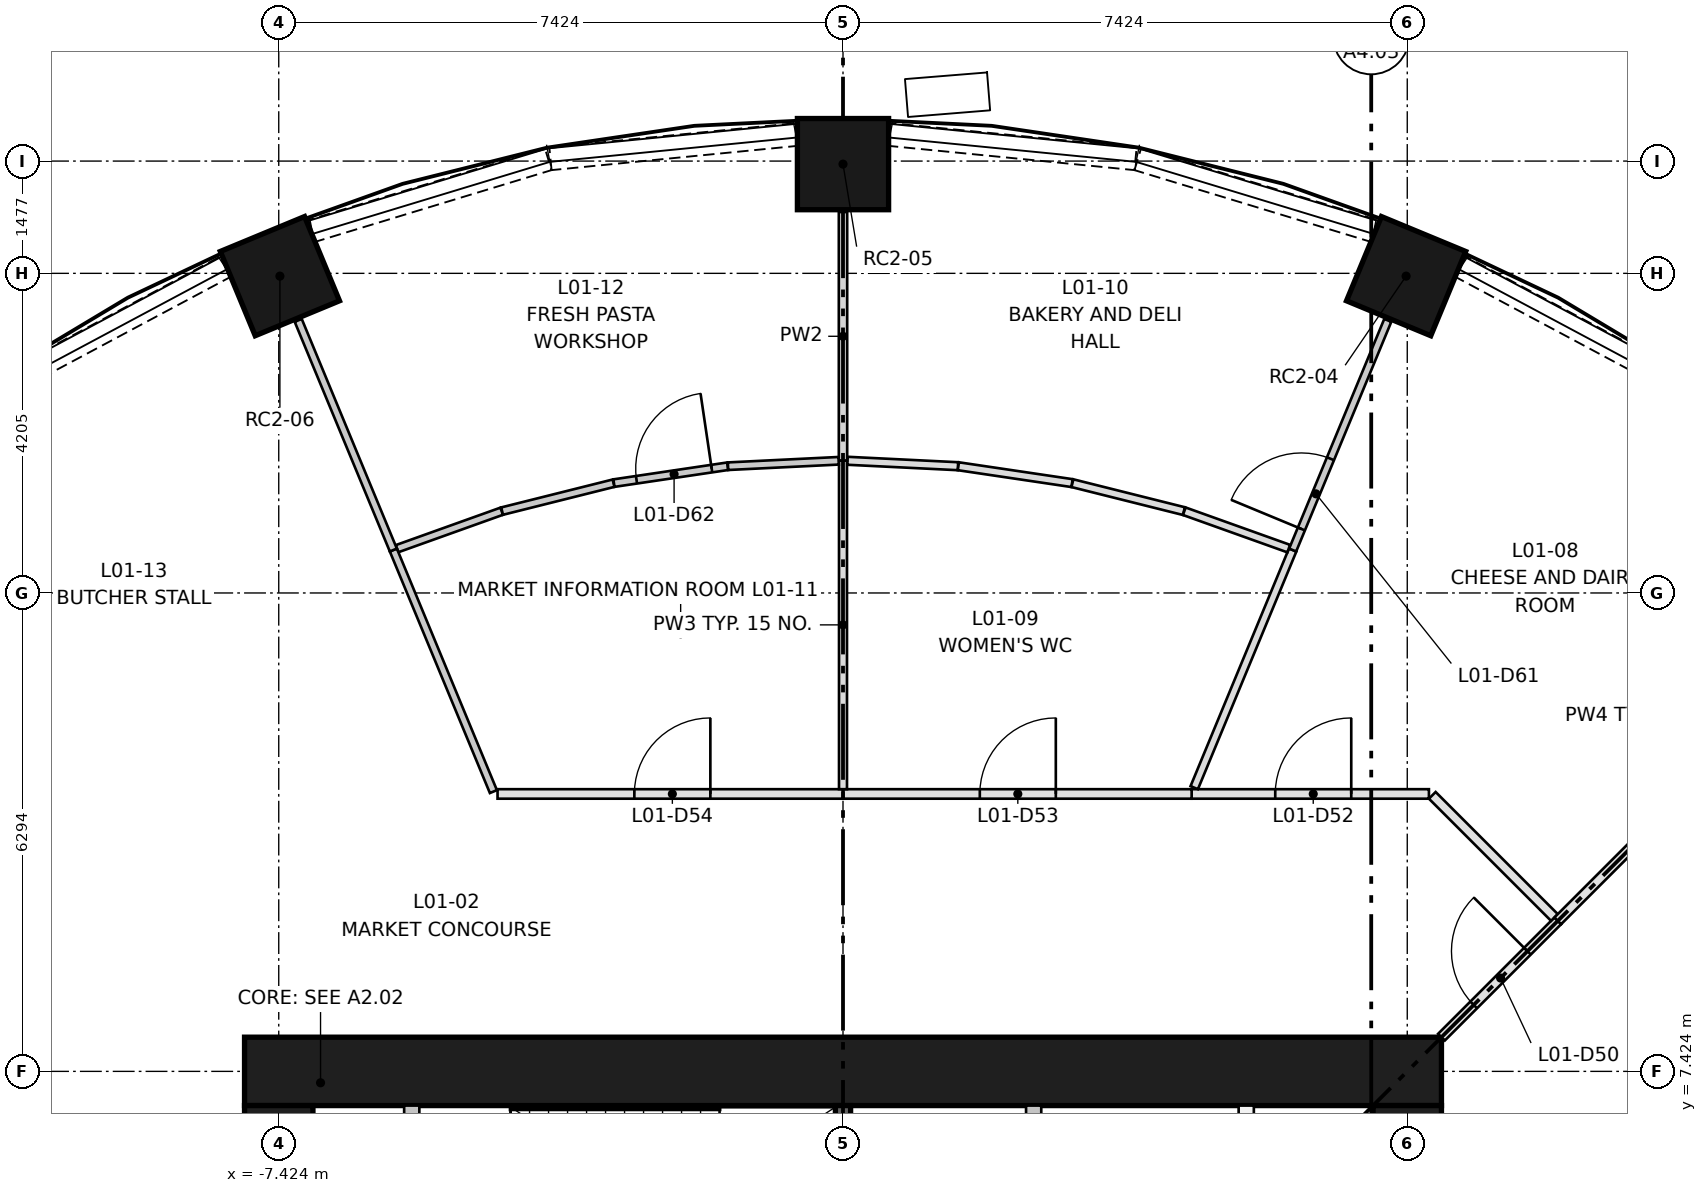
"""IFC4 building model, lengths in metres.
Left out: names, types, materials, properties, quantities, classifications, styles, units other than length and angle.
Written with IfcOpenShell. Run it as: python <this file> out.ifc"""

import sys

from ifc_helpers import new_model, si_unit, direction, frame, frame_2d, origin, origin_2d, place, context, subcontext, project, spatial, rectangle, extrude, element, fill, save


model = new_model("IFC4")
c1 = context("Model", 3, precision=1e-05, world=origin(), true_north=direction((0.0, 1.0)))
c2 = subcontext(c1, "Body", "Model", "MODEL_VIEW")
j1 = project(units=[si_unit("LENGTHUNIT", "METRE"), si_unit("PLANEANGLEUNIT", "RADIAN")], contexts=[c1])
p1 = place(None, origin())
s1 = spatial("IfcSite", under=j1, at=p1, CompositionType="ELEMENT")
p2 = place(p1, origin())
s2 = spatial("IfcBuilding", under=s1, at=p2, CompositionType="ELEMENT")
p3 = place(p2, frame((0.0, 0.0, 5.2)))
s3 = spatial("IfcBuildingStorey", under=s2, at=p3, CompositionType="ELEMENT", Elevation=5.2)
for number, where, z_axis, x_axis in (
    (1, (7.409, 17.886, 0.0), (0.0, 0.0, 1.0), (0.383, 0.924, 0.0)),
    (2, (0.0, 19.36, 0.0), (0.0, 0.0, 1.0), (0.0, 1.0, 0.0)),
    (3, (-7.409, 17.886, 0.0), (0.0, 0.0, 1.0), (-0.383, 0.924, 0.0)),
):
    element("IfcColumn", number, at=place(p3, frame(where, z_axis=z_axis, x_axis=x_axis)), inside=s3, PredefinedType="COLUMN", context=c2, shape_type="SweptSolid", body=[
        extrude(rectangle(XDim=1.2, YDim=1.2, at=origin_2d()), origin(), (0.0, 0.0, 1.0), 4.7),
    ])
p4 = place(p3, frame((-7.874, 7.424, 0.0), z_axis=(0.0, 0.0, 1.0), x_axis=(1.0, 0.0, 0.0)))
e4 = element("IfcWall", 4, at=p4, inside=s3, PredefinedType="SHEAR", context=c2, shape_type="SweptSolid", body=[
    extrude(rectangle(XDim=15.748, YDim=0.9, at=frame_2d((7.874, 0.0))), origin(), (0.0, 0.0, 1.0), 4.7),
])
p5 = place(p3, frame((-7.424, -6.974, 0.0), z_axis=(0.0, 0.0, 1.0), x_axis=(0.0, 1.0, 0.0)))
e5 = element("IfcWall", 5, at=p5, inside=s3, PredefinedType="SHEAR", context=c2, shape_type="SweptSolid", body=[
    extrude(rectangle(XDim=13.948, YDim=0.9, at=frame_2d((6.974, 0.0))), origin(), (0.0, 0.0, 1.0), 4.7),
])
p6 = place(p5, frame((6.474, 0.0, 0.0)))
e6 = element("IfcOpeningElement", 6, at=p6, cuts=e5, PredefinedType="OPENING", context=c2, shape_type="SweptSolid", body=[
    extrude(rectangle(XDim=1.0, YDim=2.1, at=frame_2d((0.5, 1.05))), frame((0.0, 0.46, 0.0), z_axis=(0.0, -1.0, 0.0), x_axis=(1.0, 0.0, 0.0)), (0.0, 0.0, 1.0), 0.92),
])
p7 = place(p5, frame((3.35, 0.0, 0.0)))
e7 = element("IfcOpeningElement", 7, at=p7, cuts=e5, PredefinedType="OPENING", context=c2, shape_type="SweptSolid", body=[
    extrude(rectangle(XDim=1.8, YDim=2.1, at=frame_2d((0.9, 1.05))), frame((0.0, 0.46, 0.0), z_axis=(0.0, -1.0, 0.0), x_axis=(1.0, 0.0, 0.0)), (0.0, 0.0, 1.0), 0.92),
])
p8 = place(p5, frame((8.799, 0.0, 0.0)))
e8 = element("IfcOpeningElement", 8, at=p8, cuts=e5, PredefinedType="OPENING", context=c2, shape_type="SweptSolid", body=[
    extrude(rectangle(XDim=1.8, YDim=2.1, at=frame_2d((0.9, 1.05))), frame((0.0, 0.46, 0.0), z_axis=(0.0, -1.0, 0.0), x_axis=(1.0, 0.0, 0.0)), (0.0, 0.0, 1.0), 0.92),
])
p9 = place(p5, frame((11.974, 0.0, 0.0)))
e9 = element("IfcOpeningElement", 9, at=p9, cuts=e5, PredefinedType="OPENING", context=c2, shape_type="SweptSolid", body=[
    extrude(rectangle(XDim=1.0, YDim=2.1, at=frame_2d((0.5, 1.05))), frame((0.0, 0.46, 0.0), z_axis=(0.0, -1.0, 0.0), x_axis=(1.0, 0.0, 0.0)), (0.0, 0.0, 1.0), 0.92),
])
p10 = place(p3, frame((7.424, -6.974, 0.0), z_axis=(0.0, 0.0, 1.0), x_axis=(0.0, 1.0, 0.0)))
e10 = element("IfcWall", 10, at=p10, inside=s3, PredefinedType="SHEAR", context=c2, shape_type="SweptSolid", body=[
    extrude(rectangle(XDim=13.948, YDim=0.9, at=frame_2d((6.974, 0.0))), origin(), (0.0, 0.0, 1.0), 4.7),
])
p11 = place(p10, frame((6.474, 0.0, 0.0)))
e11 = element("IfcOpeningElement", 11, at=p11, cuts=e10, PredefinedType="OPENING", context=c2, shape_type="SweptSolid", body=[
    extrude(rectangle(XDim=1.0, YDim=2.1, at=frame_2d((0.5, 1.05))), frame((0.0, 0.46, 0.0), z_axis=(0.0, -1.0, 0.0), x_axis=(1.0, 0.0, 0.0)), (0.0, 0.0, 1.0), 0.92),
])
p12 = place(p10, frame((3.35, 0.0, 0.0)))
e12 = element("IfcOpeningElement", 12, at=p12, cuts=e10, PredefinedType="OPENING", context=c2, shape_type="SweptSolid", body=[
    extrude(rectangle(XDim=1.8, YDim=2.1, at=frame_2d((0.9, 1.05))), frame((0.0, 0.46, 0.0), z_axis=(0.0, -1.0, 0.0), x_axis=(1.0, 0.0, 0.0)), (0.0, 0.0, 1.0), 0.92),
])
p13 = place(p10, frame((8.799, 0.0, 0.0)))
e13 = element("IfcOpeningElement", 13, at=p13, cuts=e10, PredefinedType="OPENING", context=c2, shape_type="SweptSolid", body=[
    extrude(rectangle(XDim=1.8, YDim=2.1, at=frame_2d((0.9, 1.05))), frame((0.0, 0.46, 0.0), z_axis=(0.0, -1.0, 0.0), x_axis=(1.0, 0.0, 0.0)), (0.0, 0.0, 1.0), 0.92),
])
p14 = place(p3, frame((0.0, 5.574, 0.0), z_axis=(0.0, 0.0, 1.0), x_axis=(0.0, 1.0, 0.0)))
e14 = element("IfcWall", 14, at=p14, inside=s3, PredefinedType="SHEAR", context=c2, shape_type="SweptSolid", body=[
    extrude(rectangle(XDim=1.4, YDim=0.2, at=frame_2d((0.7, 0.0))), origin(), (0.0, 0.0, 1.0), 4.3),
])
for number, where, z_axis, x_axis in (
    (15, (2.509, 4.174, 0.0), (0.0, 0.0, 1.0), (0.0, 1.0, 0.0)),
    (16, (5.305, 4.174, 0.0), (0.0, 0.0, 1.0), (0.0, 1.0, 0.0)),
):
    element("IfcWall", number, at=place(p3, frame(where, z_axis=z_axis, x_axis=x_axis)), inside=s3, PredefinedType="PARTITIONING", context=c2, shape_type="SweptSolid", body=[
        extrude(rectangle(XDim=2.8, YDim=0.2, at=frame_2d((1.4, 0.0))), origin(), (0.0, 0.0, 1.0), 4.3),
    ])
p15 = place(p3, frame((-5.674, 4.174, 0.0), z_axis=(0.0, 0.0, 1.0), x_axis=(0.0, 1.0, 0.0)))
e17 = element("IfcWall", 17, at=p15, inside=s3, PredefinedType="PARTITIONING", context=c2, shape_type="SweptSolid", body=[
    extrude(rectangle(XDim=2.8, YDim=0.2, at=frame_2d((1.4, 0.0))), origin(), (0.0, 0.0, 1.0), 4.3),
])
p16 = place(p15, frame((0.125, 0.0, 0.0)))
e18 = element("IfcOpeningElement", 18, at=p16, cuts=e17, PredefinedType="OPENING", context=c2, shape_type="SweptSolid", body=[
    extrude(rectangle(XDim=0.95, YDim=2.1, at=frame_2d((0.475, 1.05))), frame((0.0, 0.11, 0.0), z_axis=(0.0, -1.0, 0.0), x_axis=(1.0, 0.0, 0.0)), (0.0, 0.0, 1.0), 0.22),
])
p17 = place(p15, frame((1.725, 0.0, 0.0)))
e19 = element("IfcOpeningElement", 19, at=p17, cuts=e17, PredefinedType="OPENING", context=c2, shape_type="SweptSolid", body=[
    extrude(rectangle(XDim=0.95, YDim=2.1, at=frame_2d((0.475, 1.05))), frame((0.0, 0.11, 0.0), z_axis=(0.0, -1.0, 0.0), x_axis=(1.0, 0.0, 0.0)), (0.0, 0.0, 1.0), 0.22),
])
p18 = place(p3, frame((10.993, 16.478, 0.0), z_axis=(0.0, 0.0, 1.0), x_axis=(-0.881968250723, 0.471308820961, 0.0)))
e20 = element("IfcWall", 20, at=p18, inside=s3, PredefinedType="SOLIDWALL", context=c2, shape_type="SweptSolid", body=[
    extrude(rectangle(XDim=3.252, YDim=0.3, at=frame_2d((1.626, 0.0))), origin(), (0.0, 0.0, 1.0), 0.45),
])
p19 = place(p3, frame((6.99, 18.48, 0.0), z_axis=(0.0, 0.0, 1.0), x_axis=(-0.956935334366, 0.290301164038, 0.0)))
e21 = element("IfcWall", 21, at=p19, inside=s3, PredefinedType="SOLIDWALL", context=c2, shape_type="SweptSolid", body=[
    extrude(rectangle(XDim=3.252, YDim=0.3, at=frame_2d((1.626, 0.0))), origin(), (0.0, 0.0, 1.0), 0.45),
])
for number, where, z_axis, x_axis in (
    (22, (3.849, 19.43, 0.0), (0.0, 0.0, 1.0), (-0.995, 0.098, 0.0)),
    (23, (-0.613, 19.75, 0.0), (0.0, 0.0, 1.0), (-0.995, -0.098, 0.0)),
):
    element("IfcWall", number, at=place(p3, frame(where, z_axis=z_axis, x_axis=x_axis)), inside=s3, PredefinedType="SOLIDWALL", context=c2, shape_type="SweptSolid", body=[
        extrude(rectangle(XDim=3.252, YDim=0.3, at=frame_2d((1.626, 0.0))), origin(), (0.0, 0.0, 1.0), 0.45),
    ])
p20 = place(p3, frame((-3.878, 19.425, 0.0), z_axis=(0.0, 0.0, 1.0), x_axis=(-0.956935334366, -0.290301164038, 0.0)))
e24 = element("IfcWall", 24, at=p20, inside=s3, PredefinedType="SOLIDWALL", context=c2, shape_type="SweptSolid", body=[
    extrude(rectangle(XDim=3.252, YDim=0.3, at=frame_2d((1.626, 0.0))), origin(), (0.0, 0.0, 1.0), 0.45),
])
p21 = place(p3, frame((-8.124, 18.011, 0.0), z_axis=(0.0, 0.0, 1.0), x_axis=(-0.881968250723, -0.471308820961, 0.0)))
e25 = element("IfcWall", 25, at=p21, inside=s3, PredefinedType="SOLIDWALL", context=c2, shape_type="SweptSolid", body=[
    extrude(rectangle(XDim=3.252, YDim=0.3, at=frame_2d((1.626, 0.0))), origin(), (0.0, 0.0, 1.0), 0.45),
])
p22 = place(p3, frame((7.874, 7.874, 0.0), z_axis=(0.0, 0.0, 1.0), x_axis=(0.707106781187, 0.707106781187, 0.0)))
e26 = element("IfcWall", 26, at=p22, inside=s3, PredefinedType="PARTITIONING", context=c2, shape_type="SweptSolid", body=[
    extrude(rectangle(XDim=2.165, YDim=0.125, at=frame_2d((1.082, 0.0))), origin(), (0.0, 0.0, 1.0), 4.3),
])
p23 = place(p22, frame((0.6, 0.0, 0.0)))
e27 = element("IfcOpeningElement", 27, at=p23, cuts=e26, PredefinedType="OPENING", context=c2, shape_type="SweptSolid", body=[
    extrude(rectangle(XDim=1.0, YDim=2.1, at=frame_2d((0.5, 1.05))), frame((0.0, 0.073, 0.0), z_axis=(0.0, -1.0, 0.0), x_axis=(1.0, 0.0, 0.0)), (0.0, 0.0, 1.0), 0.145),
])
p24 = place(p3, frame((4.587, 11.074, 0.0), z_axis=(0.0, 0.0, 1.0), x_axis=(1.0, 0.0, 0.0)))
e28 = element("IfcWall", 28, at=p24, inside=s3, PredefinedType="PARTITIONING", context=c2, shape_type="SweptSolid", body=[
    extrude(rectangle(XDim=3.122, YDim=0.125, at=frame_2d((1.561, 0.0))), origin(), (0.0, 0.0, 1.0), 4.3),
])
p25 = place(p24, frame((1.1, 0.0, 0.0)))
e29 = element("IfcOpeningElement", 29, at=p25, cuts=e28, PredefinedType="OPENING", context=c2, shape_type="SweptSolid", body=[
    extrude(rectangle(XDim=1.0, YDim=2.1, at=frame_2d((0.5, 1.05))), frame((0.0, 0.073, 0.0), z_axis=(0.0, -1.0, 0.0), x_axis=(1.0, 0.0, 0.0)), (0.0, 0.0, 1.0), 0.145),
])
p26 = place(p3, frame((7.753, 11.056, 0.0), z_axis=(0.0, 0.0, 1.0), x_axis=(0.707106781187, -0.707106781187, 0.0)))
e30 = element("IfcWall", 30, at=p26, inside=s3, PredefinedType="PARTITIONING", context=c2, shape_type="SweptSolid", body=[
    extrude(rectangle(XDim=2.272, YDim=0.125, at=frame_2d((1.136, 0.0))), origin(), (0.0, 0.0, 1.0), 4.3),
])
p27 = place(p3, frame((0.0, 11.074, 0.0), z_axis=(0.0, 0.0, 1.0), x_axis=(1.0, 0.0, 0.0)))
e31 = element("IfcWall", 31, at=p27, inside=s3, PredefinedType="PARTITIONING", context=c2, shape_type="SweptSolid", body=[
    extrude(rectangle(XDim=4.587, YDim=0.125, at=frame_2d((2.293, 0.0))), origin(), (0.0, 0.0, 1.0), 4.3),
])
p28 = place(p27, frame((1.8, 0.0, 0.0)))
e32 = element("IfcOpeningElement", 32, at=p28, cuts=e31, PredefinedType="OPENING", context=c2, shape_type="SweptSolid", body=[
    extrude(rectangle(XDim=1.0, YDim=2.1, at=frame_2d((0.5, 1.05))), frame((0.0, 0.073, 0.0), z_axis=(0.0, -1.0, 0.0), x_axis=(1.0, 0.0, 0.0)), (0.0, 0.0, 1.0), 0.145),
])
p29 = place(p3, frame((-4.545, 11.074, 0.0), z_axis=(0.0, 0.0, 1.0), x_axis=(1.0, 0.0, 0.0)))
e33 = element("IfcWall", 33, at=p29, inside=s3, PredefinedType="PARTITIONING", context=c2, shape_type="SweptSolid", body=[
    extrude(rectangle(XDim=4.545, YDim=0.125, at=frame_2d((2.272, 0.0))), origin(), (0.0, 0.0, 1.0), 4.3),
])
p30 = place(p29, frame((1.8, 0.0, 0.0)))
e34 = element("IfcOpeningElement", 34, at=p30, cuts=e33, PredefinedType="OPENING", context=c2, shape_type="SweptSolid", body=[
    extrude(rectangle(XDim=1.0, YDim=2.1, at=frame_2d((0.5, 1.05))), frame((0.0, 0.073, 0.0), z_axis=(0.0, -1.0, 0.0), x_axis=(1.0, 0.0, 0.0)), (0.0, 0.0, 1.0), 0.145),
])
p31 = place(p3, frame((9.405, 9.405, 0.0), z_axis=(0.0, 0.0, 1.0), x_axis=(0.707106781187, 0.707106781187, 0.0)))
e35 = element("IfcWall", 35, at=p31, inside=s3, PredefinedType="PARTITIONING", context=c2, shape_type="SweptSolid", body=[
    extrude(rectangle(XDim=5.43, YDim=0.125, at=frame_2d((2.715, 0.0))), origin(), (0.0, 0.0, 1.0), 4.3),
])
p32 = place(p3, frame((4.621, 11.156, 0.0), z_axis=(0.0, 0.0, 1.0), x_axis=(0.382693709436, 0.923875275542, 0.0)))
e36 = element("IfcWall", 36, at=p32, inside=s3, PredefinedType="PARTITIONING", context=c2, shape_type="SweptSolid", body=[
    extrude(rectangle(XDim=3.384, YDim=0.105, at=frame_2d((1.692, 0.0))), origin(), (0.0, 0.0, 1.0), 4.3),
])
p33 = place(p3, frame((5.916, 14.283, 0.0), z_axis=(0.0, 0.0, 1.0), x_axis=(0.382716658507, 0.923865769093, 0.0)))
e37 = element("IfcWall", 37, at=p33, inside=s3, PredefinedType="PARTITIONING", context=c2, shape_type="SweptSolid", body=[
    extrude(rectangle(XDim=3.27, YDim=0.1, at=frame_2d((1.635, 0.0))), origin(), (0.0, 0.0, 1.0), 4.3),
])
p34 = place(p33, frame((0.3, 0.0, 0.0)))
e38 = element("IfcOpeningElement", 38, at=p34, cuts=e37, PredefinedType="OPENING", context=c2, shape_type="SweptSolid", body=[
    extrude(rectangle(XDim=1.0, YDim=2.1, at=frame_2d((0.5, 1.05))), frame((0.0, 0.06, 0.0), z_axis=(0.0, -1.0, 0.0), x_axis=(1.0, 0.0, 0.0)), (0.0, 0.0, 1.0), 0.12),
])
p35 = place(p3, frame((0.058, 15.457, 0.0), z_axis=(0.0, 0.0, 1.0), x_axis=(0.998793780374, -0.049101774773, 0.0)))
e39 = element("IfcWall", 39, at=p35, inside=s3, PredefinedType="PARTITIONING", context=c2, shape_type="SweptSolid", body=[
    extrude(rectangle(XDim=1.457, YDim=0.105, at=frame_2d((0.729, 0.0))), origin(), (0.0, 0.0, 1.0), 4.3),
])
for number, where, z_axis, x_axis in (
    (40, (1.518, 15.385, 0.0), (0.0, 0.0, 1.0), (0.989, -0.147, 0.0)),
    (41, (3.019, 15.162, 0.0), (0.0, 0.0, 1.0), (0.97, -0.243, 0.0)),
):
    element("IfcWall", number, at=place(p3, frame(where, z_axis=z_axis, x_axis=x_axis)), inside=s3, PredefinedType="PARTITIONING", context=c2, shape_type="SweptSolid", body=[
        extrude(rectangle(XDim=1.512, YDim=0.105, at=frame_2d((0.756, 0.0))), origin(), (0.0, 0.0, 1.0), 4.3),
    ])
p36 = place(p3, frame((4.49, 14.793, 0.0), z_axis=(0.0, 0.0, 1.0), x_axis=(0.941548755583, -0.336876744314, 0.0)))
e42 = element("IfcWall", 42, at=p36, inside=s3, PredefinedType="PARTITIONING", context=c2, shape_type="SweptSolid", body=[
    extrude(rectangle(XDim=1.459, YDim=0.105, at=frame_2d((0.73, 0.0))), origin(), (0.0, 0.0, 1.0), 4.3),
])
p37 = place(p3, frame((0.0, 11.136, 0.0), z_axis=(0.0, 0.0, 1.0), x_axis=(0.0, 1.0, 0.0)))
e43 = element("IfcWall", 43, at=p37, inside=s3, PredefinedType="PARTITIONING", context=c2, shape_type="SweptSolid", body=[
    extrude(rectangle(XDim=4.323, YDim=0.105, at=frame_2d((2.162, 0.0))), origin(), (0.0, 0.0, 1.0), 4.3),
])
p38 = place(p3, frame((0.0, 15.46, 0.0), z_axis=(0.0, 0.0, 1.0), x_axis=(0.0, 1.0, 0.0)))
e44 = element("IfcWall", 44, at=p38, inside=s3, PredefinedType="PARTITIONING", context=c2, shape_type="SweptSolid", body=[
    extrude(rectangle(XDim=3.27, YDim=0.11, at=frame_2d((1.635, 0.0))), origin(), (0.0, 0.0, 1.0), 4.3),
])
p39 = place(p3, frame((-5.867, 14.301, 0.0), z_axis=(0.0, 0.0, 1.0), x_axis=(0.941545350251, 0.336886261845, 0.0)))
e45 = element("IfcWall", 45, at=p39, inside=s3, PredefinedType="PARTITIONING", context=c2, shape_type="SweptSolid", body=[
    extrude(rectangle(XDim=1.462, YDim=0.1, at=frame_2d((0.731, 0.0))), origin(), (0.0, 0.0, 1.0), 4.3),
])
p40 = place(p3, frame((-4.485, 14.795, 0.0), z_axis=(0.0, 0.0, 1.0), x_axis=(0.970028424003, 0.242991474388, 0.0)))
e46 = element("IfcWall", 46, at=p40, inside=s3, PredefinedType="PARTITIONING", context=c2, shape_type="SweptSolid", body=[
    extrude(rectangle(XDim=1.512, YDim=0.1, at=frame_2d((0.756, 0.0))), origin(), (0.0, 0.0, 1.0), 4.3),
])
p41 = place(p3, frame((-3.014, 15.163, 0.0), z_axis=(0.0, 0.0, 1.0), x_axis=(0.989176578649, 0.146730011422, 0.0)))
e47 = element("IfcWall", 47, at=p41, inside=s3, PredefinedType="PARTITIONING", context=c2, shape_type="SweptSolid", body=[
    extrude(rectangle(XDim=1.512, YDim=0.1, at=frame_2d((0.756, 0.0))), origin(), (0.0, 0.0, 1.0), 4.3),
])
p42 = place(p41, frame((0.3, 0.0, 0.0)))
e48 = element("IfcOpeningElement", 48, at=p42, cuts=e47, PredefinedType="OPENING", context=c2, shape_type="SweptSolid", body=[
    extrude(rectangle(XDim=1.0, YDim=2.1, at=frame_2d((0.5, 1.05))), frame((0.0, 0.06, 0.0), z_axis=(0.0, -1.0, 0.0), x_axis=(1.0, 0.0, 0.0)), (0.0, 0.0, 1.0), 0.12),
])
p43 = place(p3, frame((-1.513, 15.386, 0.0), z_axis=(0.0, 0.0, 1.0), x_axis=(0.998793780374, 0.049101774773, 0.0)))
e49 = element("IfcWall", 49, at=p43, inside=s3, PredefinedType="PARTITIONING", context=c2, shape_type="SweptSolid", body=[
    extrude(rectangle(XDim=1.457, YDim=0.1, at=frame_2d((0.729, 0.0))), origin(), (0.0, 0.0, 1.0), 4.3),
])
p44 = place(p3, frame((-4.6, 11.105, 0.0), z_axis=(0.0, 0.0, 1.0), x_axis=(-0.382669369174, 0.92388535755, 0.0)))
e50 = element("IfcWall", 50, at=p44, inside=s3, PredefinedType="PARTITIONING", context=c2, shape_type="SweptSolid", body=[
    extrude(rectangle(XDim=3.44, YDim=0.1, at=frame_2d((1.72, 0.0))), origin(), (0.0, 0.0, 1.0), 4.3),
])
p45 = place(p3, frame((-5.916, 14.283, 0.0), z_axis=(0.0, 0.0, 1.0), x_axis=(-0.382716658507, 0.923865769093, 0.0)))
e51 = element("IfcWall", 51, at=p45, inside=s3, PredefinedType="PARTITIONING", context=c2, shape_type="SweptSolid", body=[
    extrude(rectangle(XDim=3.27, YDim=0.1, at=frame_2d((1.635, 0.0))), origin(), (0.0, 0.0, 1.0), 4.3),
])
p46 = place(p23, origin())
e52 = element("IfcDoor", 52, at=p46, inside=s3, OperationType="SINGLE_SWING_RIGHT", PredefinedType="DOOR", context=c2, shape_type="SweptSolid", body=[
    extrude(rectangle(XDim=1.0, YDim=2.1, at=frame_2d((0.5, 1.05))), frame((0.0, 0.025, 0.0), z_axis=(0.0, -1.0, 0.0), x_axis=(1.0, 0.0, 0.0)), (0.0, 0.0, 1.0), 0.05),
])
fill(e27, e52)
p47 = place(p25, origin())
e53 = element("IfcDoor", 53, at=p47, inside=s3, OperationType="SINGLE_SWING_RIGHT", PredefinedType="DOOR", context=c2, shape_type="SweptSolid", body=[
    extrude(rectangle(XDim=1.0, YDim=2.1, at=frame_2d((0.5, 1.05))), frame((0.0, 0.025, 0.0), z_axis=(0.0, -1.0, 0.0), x_axis=(1.0, 0.0, 0.0)), (0.0, 0.0, 1.0), 0.05),
])
fill(e29, e53)
p48 = place(p28, origin())
e54 = element("IfcDoor", 54, at=p48, inside=s3, OperationType="SINGLE_SWING_RIGHT", PredefinedType="DOOR", context=c2, shape_type="SweptSolid", body=[
    extrude(rectangle(XDim=1.0, YDim=2.1, at=frame_2d((0.5, 1.05))), frame((0.0, 0.025, 0.0), z_axis=(0.0, -1.0, 0.0), x_axis=(1.0, 0.0, 0.0)), (0.0, 0.0, 1.0), 0.05),
])
fill(e32, e54)
p49 = place(p30, origin())
e55 = element("IfcDoor", 55, at=p49, inside=s3, OperationType="SINGLE_SWING_RIGHT", PredefinedType="DOOR", context=c2, shape_type="SweptSolid", body=[
    extrude(rectangle(XDim=1.0, YDim=2.1, at=frame_2d((0.5, 1.05))), frame((0.0, 0.025, 0.0), z_axis=(0.0, -1.0, 0.0), x_axis=(1.0, 0.0, 0.0)), (0.0, 0.0, 1.0), 0.05),
])
fill(e34, e55)
p50 = place(p34, origin())
e56 = element("IfcDoor", 56, at=p50, inside=s3, OperationType="SINGLE_SWING_LEFT", PredefinedType="DOOR", context=c2, shape_type="SweptSolid", body=[
    extrude(rectangle(XDim=1.0, YDim=2.1, at=frame_2d((0.5, 1.05))), frame((0.0, 0.025, 0.0), z_axis=(0.0, -1.0, 0.0), x_axis=(1.0, 0.0, 0.0)), (0.0, 0.0, 1.0), 0.05),
])
fill(e38, e56)
p51 = place(p42, origin())
e57 = element("IfcDoor", 57, at=p51, inside=s3, OperationType="SINGLE_SWING_RIGHT", PredefinedType="DOOR", context=c2, shape_type="SweptSolid", body=[
    extrude(rectangle(XDim=1.0, YDim=2.1, at=frame_2d((0.5, 1.05))), frame((0.0, 0.025, 0.0), z_axis=(0.0, -1.0, 0.0), x_axis=(1.0, 0.0, 0.0)), (0.0, 0.0, 1.0), 0.05),
])
fill(e48, e57)
save(model, sys.argv[1])
